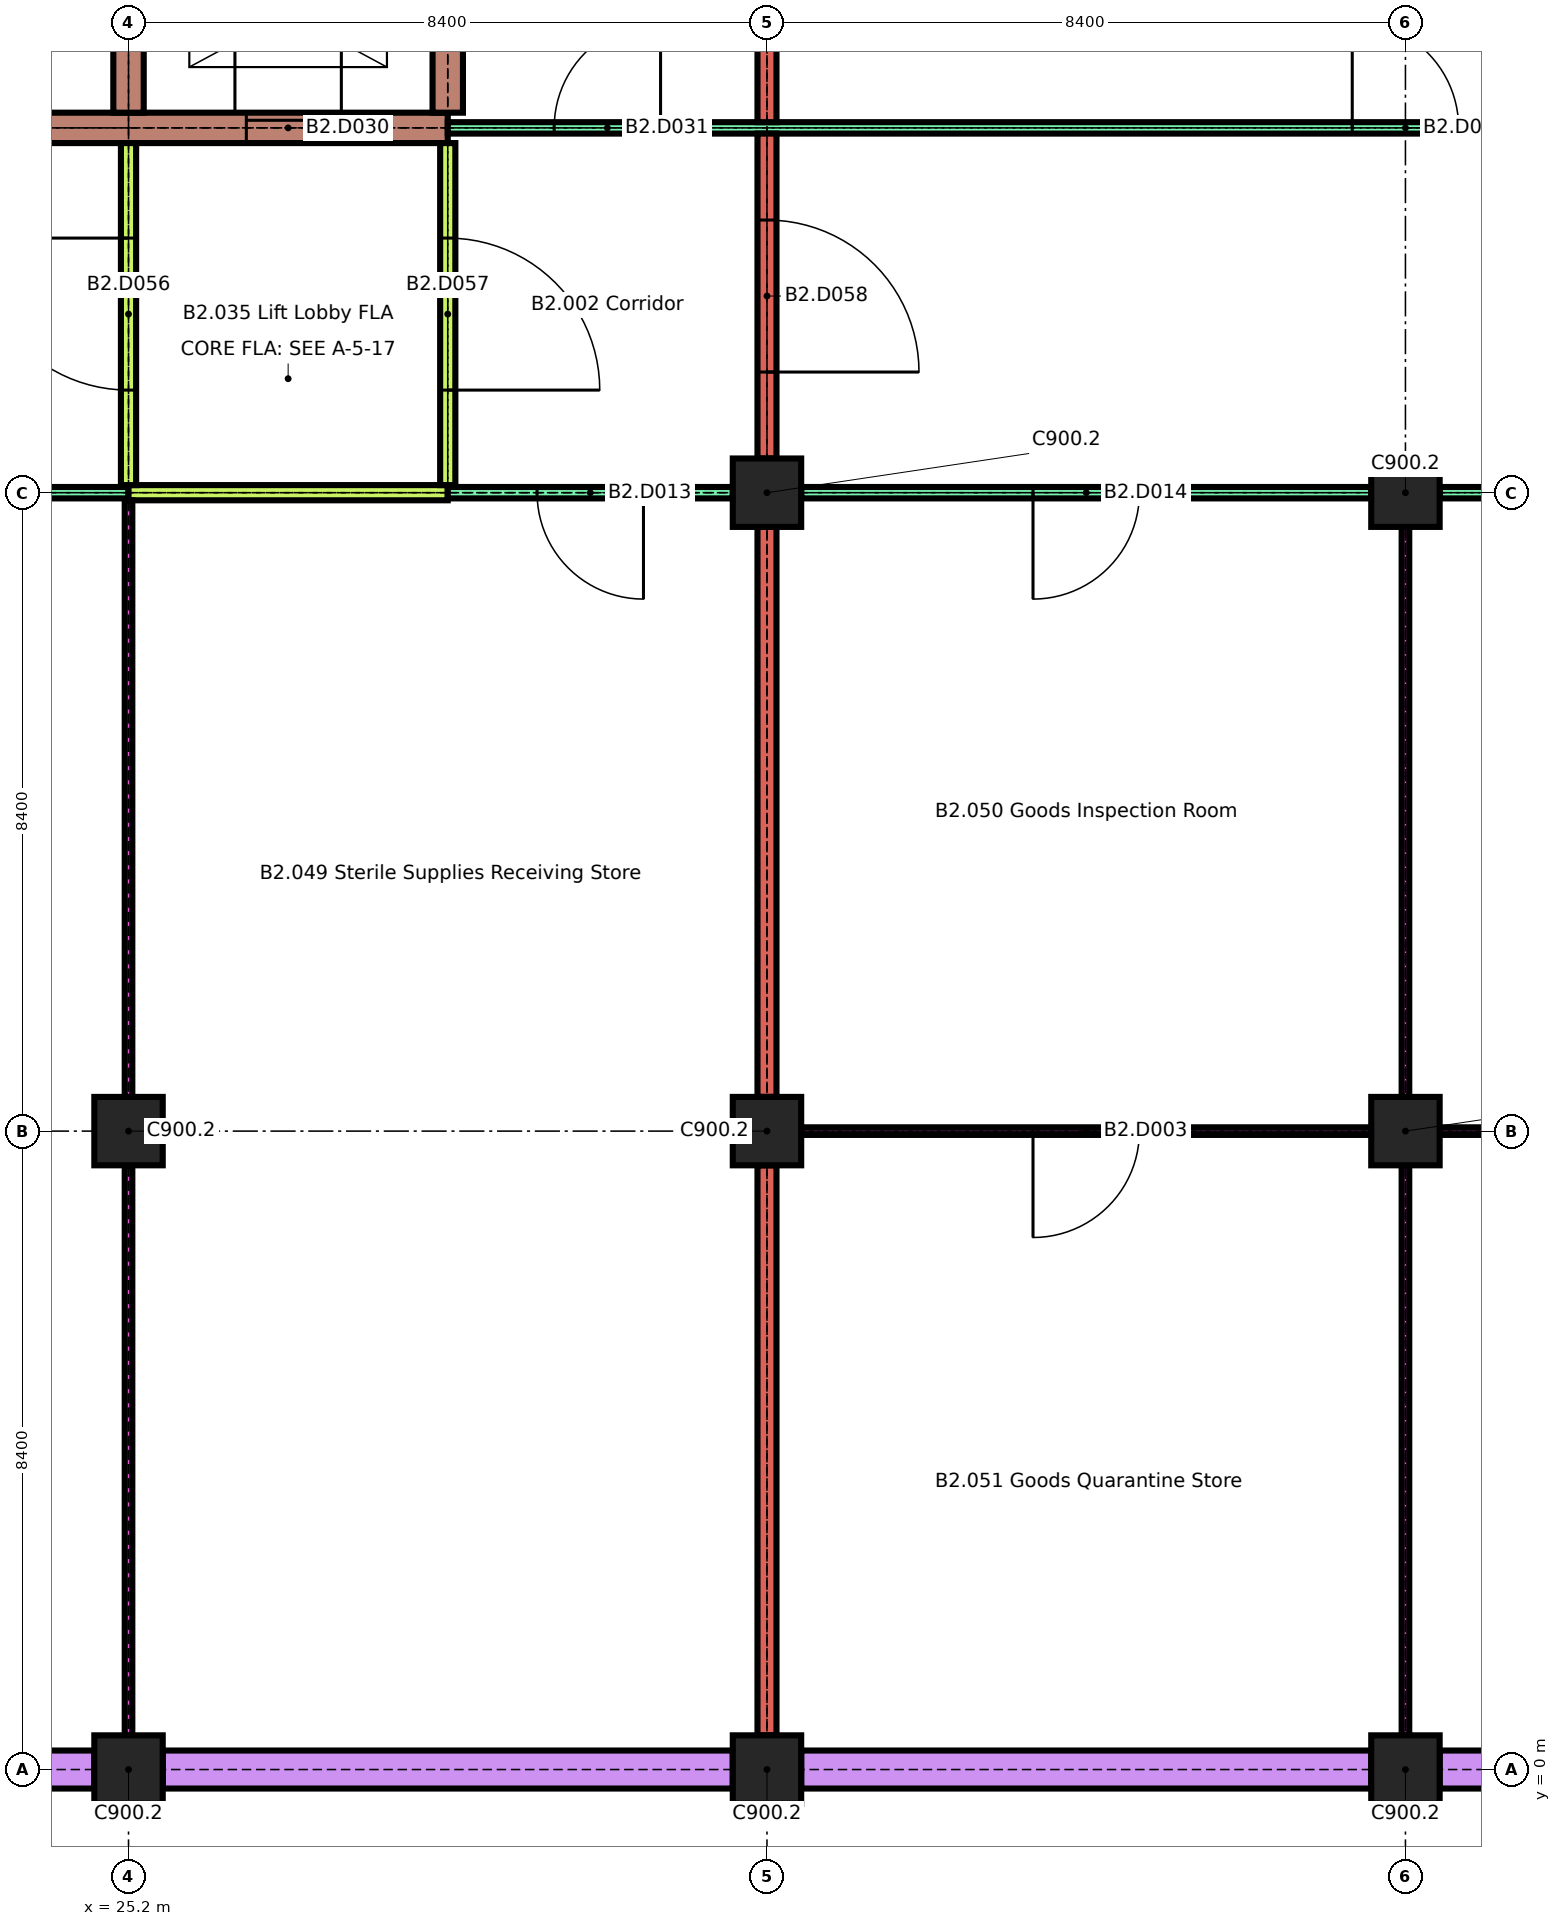
"""IFC4 building model, lengths in metres.
Left out: names, types, materials, properties, quantities, classifications, styles, units other than length and angle.
Written with IfcOpenShell. Run it as: python <this file> out.ifc"""

import sys

from ifc_helpers import new_model, si_unit, direction, frame, frame_2d, origin, origin_2d, place, context, subcontext, project, spatial, rectangle, extrude, element, fill, save


model = new_model("IFC4")
c1 = context("Model", 3, precision=1e-05, world=origin(), true_north=direction((0.0, 1.0)))
c2 = subcontext(c1, "Body", "Model", "MODEL_VIEW")
j1 = project(units=[si_unit("LENGTHUNIT", "METRE"), si_unit("PLANEANGLEUNIT", "RADIAN")], contexts=[c1])
p1 = place(None, origin())
s1 = spatial("IfcSite", under=j1, at=p1, CompositionType="ELEMENT")
p2 = place(p1, origin())
s2 = spatial("IfcBuilding", under=s1, at=p2, CompositionType="ELEMENT")
p3 = place(p2, frame((0.0, 0.0, -7.8)))
s3 = spatial("IfcBuildingStorey", under=s2, at=p3, CompositionType="ELEMENT", Elevation=-7.8)
for number, where, z_axis, x_axis in (
    (1, (25.2, 0.0, 0.0), (0.0, 0.0, 1.0), (1.0, 0.0, 0.0)),
    (2, (33.6, 0.0, 0.0), (0.0, 0.0, 1.0), (1.0, 0.0, 0.0)),
    (3, (42.0, 0.0, 0.0), (0.0, 0.0, 1.0), (1.0, 0.0, 0.0)),
    (4, (25.2, 8.4, 0.0), (0.0, 0.0, 1.0), (1.0, 0.0, 0.0)),
    (5, (33.6, 8.4, 0.0), (0.0, 0.0, 1.0), (1.0, 0.0, 0.0)),
    (6, (42.0, 8.4, 0.0), (0.0, 0.0, 1.0), (1.0, 0.0, 0.0)),
    (7, (33.6, 16.8, 0.0), (0.0, 0.0, 1.0), (1.0, 0.0, 0.0)),
    (8, (42.0, 16.8, 0.0), (0.0, 0.0, 1.0), (1.0, 0.0, 0.0)),
):
    element("IfcColumn", number, at=place(p3, frame(where, z_axis=z_axis, x_axis=x_axis)), inside=s3, PredefinedType="COLUMN", context=c2, shape_type="SweptSolid", body=[
        extrude(rectangle(XDim=0.9, YDim=0.9, at=origin_2d()), origin(), (0.0, 0.0, 1.0), 3.1),
    ])
for number, where, z_axis, x_axis in (
    (9, (17.25, 0.0, 0.0), (0.0, 0.0, 1.0), (1.0, 0.0, 0.0)),
    (10, (25.65, 0.0, 0.0), (0.0, 0.0, 1.0), (1.0, 0.0, 0.0)),
    (11, (34.05, 0.0, 0.0), (0.0, 0.0, 1.0), (1.0, 0.0, 0.0)),
    (12, (42.45, 0.0, 0.0), (0.0, 0.0, 1.0), (1.0, 0.0, 0.0)),
):
    element("IfcWall", number, at=place(p3, frame(where, z_axis=z_axis, x_axis=x_axis)), inside=s3, PredefinedType="SOLIDWALL", context=c2, shape_type="SweptSolid", body=[
        extrude(rectangle(XDim=7.5, YDim=0.5, at=frame_2d((3.75, 0.0))), origin(), (0.0, 0.0, 1.0), 3.1),
    ])
p4 = place(p3, frame((34.05, 8.4, 0.0), z_axis=(0.0, 0.0, 1.0), x_axis=(1.0, 0.0, 0.0)))
e13 = element("IfcWall", 13, at=p4, inside=s3, PredefinedType="PARTITIONING", context=c2, shape_type="SweptSolid", body=[
    extrude(rectangle(XDim=7.5, YDim=0.1, at=frame_2d((3.75, 0.0))), origin(), (0.0, 0.0, 1.0), 3.1),
])
p5 = place(p4, frame((3.05, 0.0, 0.0)))
e14 = element("IfcOpeningElement", 14, at=p5, cuts=e13, PredefinedType="OPENING", context=c2, shape_type="SweptSolid", body=[
    extrude(rectangle(XDim=1.4, YDim=2.1, at=frame_2d((0.7, 1.05))), frame((0.0, 0.06, 0.0), z_axis=(0.0, -1.0, 0.0), x_axis=(1.0, 0.0, 0.0)), (0.0, 0.0, 1.0), 0.12),
])
p6 = place(p3, frame((42.45, 8.4, 0.0), z_axis=(0.0, 0.0, 1.0), x_axis=(1.0, 0.0, 0.0)))
e15 = element("IfcWall", 15, at=p6, inside=s3, PredefinedType="PARTITIONING", context=c2, shape_type="SweptSolid", body=[
    extrude(rectangle(XDim=7.5, YDim=0.1, at=frame_2d((3.75, 0.0))), origin(), (0.0, 0.0, 1.0), 3.1),
])
p7 = place(p6, frame((3.05, 0.0, 0.0)))
e16 = element("IfcOpeningElement", 16, at=p7, cuts=e15, PredefinedType="OPENING", context=c2, shape_type="SweptSolid", body=[
    extrude(rectangle(XDim=1.4, YDim=2.1, at=frame_2d((0.7, 1.05))), frame((0.0, 0.06, 0.0), z_axis=(0.0, -1.0, 0.0), x_axis=(1.0, 0.0, 0.0)), (0.0, 0.0, 1.0), 0.12),
])
p8 = place(p3, frame((8.85, 16.8, 0.0), z_axis=(0.0, 0.0, 1.0), x_axis=(1.0, 0.0, 0.0)))
e17 = element("IfcWall", 17, at=p8, inside=s3, PredefinedType="PARTITIONING", context=c2, shape_type="SweptSolid", body=[
    extrude(rectangle(XDim=16.35, YDim=0.15, at=frame_2d((8.175, 0.0))), origin(), (0.0, 0.0, 1.0), 3.1),
])
p9 = place(p8, frame((3.275, 0.0, 0.0)))
e18 = element("IfcOpeningElement", 18, at=p9, cuts=e17, PredefinedType="OPENING", context=c2, shape_type="SweptSolid", body=[
    extrude(rectangle(XDim=1.4, YDim=2.1, at=frame_2d((0.7, 1.05))), frame((0.0, 0.085, 0.0), z_axis=(0.0, -1.0, 0.0), x_axis=(1.0, 0.0, 0.0)), (0.0, 0.0, 1.0), 0.17),
])
p10 = place(p8, frame((11.45, 0.0, 0.0)))
e19 = element("IfcOpeningElement", 19, at=p10, cuts=e17, PredefinedType="OPENING", context=c2, shape_type="SweptSolid", body=[
    extrude(rectangle(XDim=1.4, YDim=2.1, at=frame_2d((0.7, 1.05))), frame((0.0, 0.085, 0.0), z_axis=(0.0, -1.0, 0.0), x_axis=(1.0, 0.0, 0.0)), (0.0, 0.0, 1.0), 0.17),
])
p11 = place(p3, frame((25.2, 16.8, 0.0), z_axis=(0.0, 0.0, 1.0), x_axis=(1.0, 0.0, 0.0)))
e20 = element("IfcWall", 20, at=p11, inside=s3, PredefinedType="PARTITIONING", context=c2, shape_type="SweptSolid", body=[
    extrude(rectangle(XDim=4.2, YDim=0.2, at=frame_2d((2.1, 0.0))), origin(), (0.0, 0.0, 1.0), 3.1),
])
p12 = place(p3, frame((29.4, 16.8, 0.0), z_axis=(0.0, 0.0, 1.0), x_axis=(1.0, 0.0, 0.0)))
e21 = element("IfcWall", 21, at=p12, inside=s3, PredefinedType="PARTITIONING", context=c2, shape_type="SweptSolid", body=[
    extrude(rectangle(XDim=3.75, YDim=0.15, at=frame_2d((1.875, 0.0))), origin(), (0.0, 0.0, 1.0), 3.1),
])
p13 = place(p12, frame((1.175, 0.0, 0.0)))
e22 = element("IfcOpeningElement", 22, at=p13, cuts=e21, PredefinedType="OPENING", context=c2, shape_type="SweptSolid", body=[
    extrude(rectangle(XDim=1.4, YDim=2.1, at=frame_2d((0.7, 1.05))), frame((0.0, 0.085, 0.0), z_axis=(0.0, -1.0, 0.0), x_axis=(1.0, 0.0, 0.0)), (0.0, 0.0, 1.0), 0.17),
])
p14 = place(p3, frame((34.05, 16.8, 0.0), z_axis=(0.0, 0.0, 1.0), x_axis=(1.0, 0.0, 0.0)))
e23 = element("IfcWall", 23, at=p14, inside=s3, PredefinedType="PARTITIONING", context=c2, shape_type="SweptSolid", body=[
    extrude(rectangle(XDim=7.5, YDim=0.15, at=frame_2d((3.75, 0.0))), origin(), (0.0, 0.0, 1.0), 3.1),
])
p15 = place(p14, frame((3.05, 0.0, 0.0)))
e24 = element("IfcOpeningElement", 24, at=p15, cuts=e23, PredefinedType="OPENING", context=c2, shape_type="SweptSolid", body=[
    extrude(rectangle(XDim=1.4, YDim=2.1, at=frame_2d((0.7, 1.05))), frame((0.0, 0.085, 0.0), z_axis=(0.0, -1.0, 0.0), x_axis=(1.0, 0.0, 0.0)), (0.0, 0.0, 1.0), 0.17),
])
p16 = place(p3, frame((42.45, 16.8, 0.0), z_axis=(0.0, 0.0, 1.0), x_axis=(1.0, 0.0, 0.0)))
e25 = element("IfcWall", 25, at=p16, inside=s3, PredefinedType="PARTITIONING", context=c2, shape_type="SweptSolid", body=[
    extrude(rectangle(XDim=7.5, YDim=0.15, at=frame_2d((3.75, 0.0))), origin(), (0.0, 0.0, 1.0), 3.1),
])
p17 = place(p16, frame((3.05, 0.0, 0.0)))
e26 = element("IfcOpeningElement", 26, at=p17, cuts=e25, PredefinedType="OPENING", context=c2, shape_type="SweptSolid", body=[
    extrude(rectangle(XDim=1.4, YDim=2.1, at=frame_2d((0.7, 1.05))), frame((0.0, 0.085, 0.0), z_axis=(0.0, -1.0, 0.0), x_axis=(1.0, 0.0, 0.0)), (0.0, 0.0, 1.0), 0.17),
])
p18 = place(p3, frame((16.8, 21.6, 0.0), z_axis=(0.0, 0.0, 1.0), x_axis=(1.0, 0.0, 0.0)))
e27 = element("IfcWall", 27, at=p18, inside=s3, PredefinedType="SHEAR", context=c2, shape_type="SweptSolid", body=[
    extrude(rectangle(XDim=12.6, YDim=0.4, at=frame_2d((6.3, 0.0))), origin(), (0.0, 0.0, 1.0), 3.1),
])
p19 = place(p18, frame((9.95, 0.0, 0.0)))
e28 = element("IfcOpeningElement", 28, at=p19, cuts=e27, PredefinedType="OPENING", context=c2, shape_type="SweptSolid", body=[
    extrude(rectangle(XDim=1.1, YDim=2.1, at=frame_2d((0.55, 1.05))), frame((0.0, 0.21, 0.0), z_axis=(0.0, -1.0, 0.0), x_axis=(1.0, 0.0, 0.0)), (0.0, 0.0, 1.0), 0.42),
])
p20 = place(p3, frame((29.4, 21.6, 0.0), z_axis=(0.0, 0.0, 1.0), x_axis=(1.0, 0.0, 0.0)))
e29 = element("IfcWall", 29, at=p20, inside=s3, PredefinedType="PARTITIONING", context=c2, shape_type="SweptSolid", body=[
    extrude(rectangle(XDim=21.075, YDim=0.15, at=frame_2d((10.538, 0.0))), origin(), (0.0, 0.0, 1.0), 3.1),
])
p21 = place(p20, frame((1.4, 0.0, 0.0)))
e30 = element("IfcOpeningElement", 30, at=p21, cuts=e29, PredefinedType="OPENING", context=c2, shape_type="SweptSolid", body=[
    extrude(rectangle(XDim=1.4, YDim=2.1, at=frame_2d((0.7, 1.05))), frame((0.0, 0.085, 0.0), z_axis=(0.0, -1.0, 0.0), x_axis=(1.0, 0.0, 0.0)), (0.0, 0.0, 1.0), 0.17),
])
p22 = place(p20, frame((11.9, 0.0, 0.0)))
e31 = element("IfcOpeningElement", 31, at=p22, cuts=e29, PredefinedType="OPENING", context=c2, shape_type="SweptSolid", body=[
    extrude(rectangle(XDim=1.4, YDim=2.1, at=frame_2d((0.7, 1.05))), frame((0.0, 0.085, 0.0), z_axis=(0.0, -1.0, 0.0), x_axis=(1.0, 0.0, 0.0)), (0.0, 0.0, 1.0), 0.17),
])
p23 = place(p3, frame((25.2, 0.45, 0.0), z_axis=(0.0, 0.0, 1.0), x_axis=(0.0, 1.0, 0.0)))
e32 = element("IfcWall", 32, at=p23, inside=s3, PredefinedType="PARTITIONING", context=c2, shape_type="SweptSolid", body=[
    extrude(rectangle(XDim=7.5, YDim=0.1, at=frame_2d((3.75, 0.0))), origin(), (0.0, 0.0, 1.0), 3.1),
])
p24 = place(p3, frame((25.2, 8.85, 0.0), z_axis=(0.0, 0.0, 1.0), x_axis=(0.0, 1.0, 0.0)))
e33 = element("IfcWall", 33, at=p24, inside=s3, PredefinedType="PARTITIONING", context=c2, shape_type="SweptSolid", body=[
    extrude(rectangle(XDim=7.85, YDim=0.1, at=frame_2d((3.925, 0.0))), origin(), (0.0, 0.0, 1.0), 3.1),
])
p25 = place(p3, frame((25.2, 16.9, 0.0), z_axis=(0.0, 0.0, 1.0), x_axis=(0.0, 1.0, 0.0)))
e34 = element("IfcWall", 34, at=p25, inside=s3, PredefinedType="PARTITIONING", context=c2, shape_type="SweptSolid", body=[
    extrude(rectangle(XDim=4.5, YDim=0.2, at=frame_2d((2.25, 0.0))), origin(), (0.0, 0.0, 1.0), 3.1),
])
p26 = place(p25, frame((1.25, 0.0, 0.0)))
e35 = element("IfcOpeningElement", 35, at=p26, cuts=e34, PredefinedType="OPENING", context=c2, shape_type="SweptSolid", body=[
    extrude(rectangle(XDim=2.0, YDim=2.4, at=frame_2d((1.0, 1.2))), frame((0.0, 0.11, 0.0), z_axis=(0.0, -1.0, 0.0), x_axis=(1.0, 0.0, 0.0)), (0.0, 0.0, 1.0), 0.22),
])
p27 = place(p3, frame((25.2, 21.8, 0.0), z_axis=(0.0, 0.0, 1.0), x_axis=(0.0, 1.0, 0.0)))
e36 = element("IfcWall", 36, at=p27, inside=s3, PredefinedType="SHEAR", context=c2, shape_type="SweptSolid", body=[
    extrude(rectangle(XDim=3.2, YDim=0.4, at=frame_2d((1.6, 0.0))), origin(), (0.0, 0.0, 1.0), 3.1),
])
p28 = place(p3, frame((29.4, 16.9, 0.0), z_axis=(0.0, 0.0, 1.0), x_axis=(0.0, 1.0, 0.0)))
e37 = element("IfcWall", 37, at=p28, inside=s3, PredefinedType="PARTITIONING", context=c2, shape_type="SweptSolid", body=[
    extrude(rectangle(XDim=4.5, YDim=0.2, at=frame_2d((2.25, 0.0))), origin(), (0.0, 0.0, 1.0), 3.1),
])
p29 = place(p28, frame((1.25, 0.0, 0.0)))
e38 = element("IfcOpeningElement", 38, at=p29, cuts=e37, PredefinedType="OPENING", context=c2, shape_type="SweptSolid", body=[
    extrude(rectangle(XDim=2.0, YDim=2.4, at=frame_2d((1.0, 1.2))), frame((0.0, 0.11, 0.0), z_axis=(0.0, -1.0, 0.0), x_axis=(1.0, 0.0, 0.0)), (0.0, 0.0, 1.0), 0.22),
])
p30 = place(p3, frame((29.4, 21.8, 0.0), z_axis=(0.0, 0.0, 1.0), x_axis=(0.0, 1.0, 0.0)))
e39 = element("IfcWall", 39, at=p30, inside=s3, PredefinedType="SHEAR", context=c2, shape_type="SweptSolid", body=[
    extrude(rectangle(XDim=3.2, YDim=0.4, at=frame_2d((1.6, 0.0))), origin(), (0.0, 0.0, 1.0), 3.1),
])
for number, where, z_axis, x_axis in (
    (40, (33.6, 0.45, 0.0), (0.0, 0.0, 1.0), (0.0, 1.0, 0.0)),
    (41, (33.6, 8.85, 0.0), (0.0, 0.0, 1.0), (0.0, 1.0, 0.0)),
):
    element("IfcWall", number, at=place(p3, frame(where, z_axis=z_axis, x_axis=x_axis)), inside=s3, PredefinedType="SOLIDWALL", context=c2, shape_type="SweptSolid", body=[
        extrude(rectangle(XDim=7.5, YDim=0.25, at=frame_2d((3.75, 0.0))), origin(), (0.0, 0.0, 1.0), 3.1),
    ])
p31 = place(p3, frame((33.6, 17.25, 0.0), z_axis=(0.0, 0.0, 1.0), x_axis=(0.0, 1.0, 0.0)))
e42 = element("IfcWall", 42, at=p31, inside=s3, PredefinedType="SOLIDWALL", context=c2, shape_type="SweptSolid", body=[
    extrude(rectangle(XDim=4.275, YDim=0.25, at=frame_2d((2.137, 0.0))), origin(), (0.0, 0.0, 1.0), 3.1),
])
p32 = place(p31, frame((1.137, 0.0, 0.0)))
e43 = element("IfcOpeningElement", 43, at=p32, cuts=e42, PredefinedType="OPENING", context=c2, shape_type="SweptSolid", body=[
    extrude(rectangle(XDim=2.0, YDim=2.4, at=frame_2d((1.0, 1.2))), frame((0.0, 0.135, 0.0), z_axis=(0.0, -1.0, 0.0), x_axis=(1.0, 0.0, 0.0)), (0.0, 0.0, 1.0), 0.27),
])
p33 = place(p3, frame((33.6, 21.675, 0.0), z_axis=(0.0, 0.0, 1.0), x_axis=(0.0, 1.0, 0.0)))
e44 = element("IfcWall", 44, at=p33, inside=s3, PredefinedType="SOLIDWALL", context=c2, shape_type="SweptSolid", body=[
    extrude(rectangle(XDim=3.075, YDim=0.25, at=frame_2d((1.538, 0.0))), origin(), (0.0, 0.0, 1.0), 3.1),
])
for number, where, z_axis, x_axis in (
    (45, (42.0, 0.45, 0.0), (0.0, 0.0, 1.0), (0.0, 1.0, 0.0)),
    (46, (42.0, 8.85, 0.0), (0.0, 0.0, 1.0), (0.0, 1.0, 0.0)),
):
    element("IfcWall", number, at=place(p3, frame(where, z_axis=z_axis, x_axis=x_axis)), inside=s3, PredefinedType="PARTITIONING", context=c2, shape_type="SweptSolid", body=[
        extrude(rectangle(XDim=7.5, YDim=0.1, at=frame_2d((3.75, 0.0))), origin(), (0.0, 0.0, 1.0), 3.1),
    ])
p34 = place(p5, origin())
e47 = element("IfcDoor", 47, at=p34, inside=s3, OperationType="SINGLE_SWING_LEFT", PredefinedType="DOOR", context=c2, shape_type="SweptSolid", body=[
    extrude(rectangle(XDim=1.4, YDim=2.1, at=frame_2d((0.7, 1.05))), frame((0.0, 0.025, 0.0), z_axis=(0.0, -1.0, 0.0), x_axis=(1.0, 0.0, 0.0)), (0.0, 0.0, 1.0), 0.05),
])
fill(e14, e47)
p35 = place(p13, origin())
e48 = element("IfcDoor", 48, at=p35, inside=s3, OperationType="SINGLE_SWING_RIGHT", PredefinedType="DOOR", context=c2, shape_type="SweptSolid", body=[
    extrude(rectangle(XDim=1.4, YDim=2.1, at=frame_2d((0.7, 1.05))), frame((0.0, 0.025, 0.0), z_axis=(0.0, -1.0, 0.0), x_axis=(1.0, 0.0, 0.0)), (0.0, 0.0, 1.0), 0.05),
])
fill(e22, e48)
p36 = place(p15, origin())
e49 = element("IfcDoor", 49, at=p36, inside=s3, OperationType="SINGLE_SWING_LEFT", PredefinedType="DOOR", context=c2, shape_type="SweptSolid", body=[
    extrude(rectangle(XDim=1.4, YDim=2.1, at=frame_2d((0.7, 1.05))), frame((0.0, 0.025, 0.0), z_axis=(0.0, -1.0, 0.0), x_axis=(1.0, 0.0, 0.0)), (0.0, 0.0, 1.0), 0.05),
])
fill(e24, e49)
p37 = place(p19, origin())
e50 = element("IfcDoor", 50, at=p37, inside=s3, OperationType="SLIDING_TO_LEFT", PredefinedType="DOOR", context=c2, shape_type="SweptSolid", body=[
    extrude(rectangle(XDim=1.1, YDim=2.1, at=frame_2d((0.55, 1.05))), frame((0.0, 0.025, 0.0), z_axis=(0.0, -1.0, 0.0), x_axis=(1.0, 0.0, 0.0)), (0.0, 0.0, 1.0), 0.05),
])
fill(e28, e50)
p38 = place(p21, origin())
e51 = element("IfcDoor", 51, at=p38, inside=s3, OperationType="SINGLE_SWING_LEFT", PredefinedType="DOOR", context=c2, shape_type="SweptSolid", body=[
    extrude(rectangle(XDim=1.4, YDim=2.1, at=frame_2d((0.7, 1.05))), frame((0.0, 0.025, 0.0), z_axis=(0.0, -1.0, 0.0), x_axis=(1.0, 0.0, 0.0)), (0.0, 0.0, 1.0), 0.05),
])
fill(e30, e51)
p39 = place(p22, origin())
e52 = element("IfcDoor", 52, at=p39, inside=s3, OperationType="SINGLE_SWING_RIGHT", PredefinedType="DOOR", context=c2, shape_type="SweptSolid", body=[
    extrude(rectangle(XDim=1.4, YDim=2.1, at=frame_2d((0.7, 1.05))), frame((0.0, 0.025, 0.0), z_axis=(0.0, -1.0, 0.0), x_axis=(1.0, 0.0, 0.0)), (0.0, 0.0, 1.0), 0.05),
])
fill(e31, e52)
p40 = place(p26, origin())
e53 = element("IfcDoor", 53, at=p40, inside=s3, OperationType="SINGLE_SWING_LEFT", PredefinedType="DOOR", context=c2, shape_type="SweptSolid", body=[
    extrude(rectangle(XDim=2.0, YDim=2.4, at=frame_2d((1.0, 1.2))), frame((0.0, 0.03, 0.0), z_axis=(0.0, -1.0, 0.0), x_axis=(1.0, 0.0, 0.0)), (0.0, 0.0, 1.0), 0.06),
])
fill(e35, e53)
p41 = place(p29, origin())
e54 = element("IfcDoor", 54, at=p41, inside=s3, OperationType="SINGLE_SWING_LEFT", PredefinedType="DOOR", context=c2, shape_type="SweptSolid", body=[
    extrude(rectangle(XDim=2.0, YDim=2.4, at=frame_2d((1.0, 1.2))), frame((0.0, 0.03, 0.0), z_axis=(0.0, -1.0, 0.0), x_axis=(1.0, 0.0, 0.0)), (0.0, 0.0, 1.0), 0.06),
])
fill(e38, e54)
p42 = place(p32, origin())
e55 = element("IfcDoor", 55, at=p42, inside=s3, OperationType="SINGLE_SWING_LEFT", PredefinedType="DOOR", context=c2, shape_type="SweptSolid", body=[
    extrude(rectangle(XDim=2.0, YDim=2.4, at=frame_2d((1.0, 1.2))), frame((0.0, 0.03, 0.0), z_axis=(0.0, -1.0, 0.0), x_axis=(1.0, 0.0, 0.0)), (0.0, 0.0, 1.0), 0.06),
])
fill(e43, e55)
save(model, sys.argv[1])
